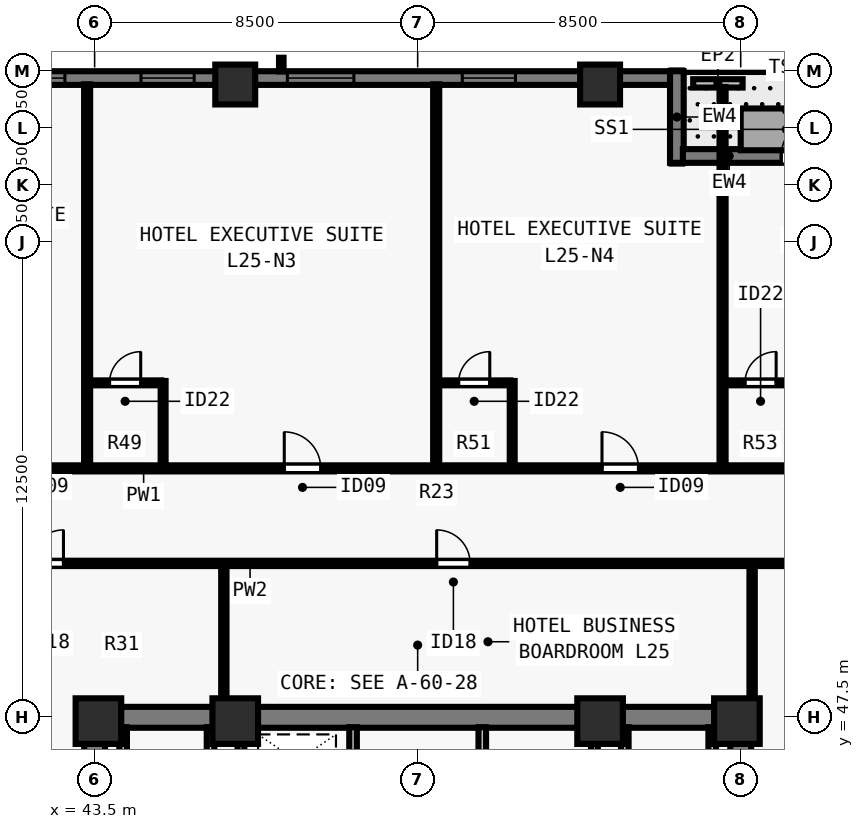
"""IFC4 building model, lengths in metres.
Left out: names, types, materials, properties, quantities, classifications, styles, units other than length and angle.
Written with IfcOpenShell. Run it as: python <this file> out.ifc"""

import sys

from ifc_helpers import new_model, si_unit, direction, frame, frame_2d, origin, origin_2d, place, context, subcontext, project, spatial, rectangle, extrude, element, fill, save


model = new_model("IFC4")
c1 = context("Model", 3, precision=1e-05, world=origin(), true_north=direction((0.0, 1.0)))
c2 = subcontext(c1, "Body", "Model", "MODEL_VIEW")
j1 = project(units=[si_unit("LENGTHUNIT", "METRE"), si_unit("PLANEANGLEUNIT", "RADIAN")], contexts=[c1])
p1 = place(None, origin())
s1 = spatial("IfcSite", under=j1, at=p1, CompositionType="ELEMENT")
p2 = place(p1, origin())
s2 = spatial("IfcBuilding", under=s1, at=p2, CompositionType="ELEMENT")
p3 = place(p2, frame((0.0, 0.0, 93.5)))
s3 = spatial("IfcBuildingStorey", under=s2, at=p3, CompositionType="ELEMENT", Elevation=93.5)
for number, where, z_axis, x_axis in (
    (1, (43.6, 47.4, 0.0), (0.0, 0.0, 1.0), (1.0, 0.0, 0.0)),
    (2, (47.2, 47.4, 0.0), (0.0, 0.0, 1.0), (1.0, 0.0, 0.0)),
    (3, (56.8, 47.4, 0.0), (0.0, 0.0, 1.0), (1.0, 0.0, 0.0)),
    (4, (60.4, 47.4, 0.0), (0.0, 0.0, 1.0), (1.0, 0.0, 0.0)),
):
    element("IfcColumn", number, at=place(p3, frame(where, z_axis=z_axis, x_axis=x_axis)), inside=s3, PredefinedType="COLUMN", context=c2, shape_type="SweptSolid", body=[
        extrude(rectangle(XDim=1.2, YDim=1.2, at=origin_2d()), origin(), (0.0, 0.0, 1.0), 3.5),
    ])
for number, where, z_axis, x_axis in (
    (5, (56.8, 64.15, 0.0), (0.0, 0.0, 1.0), (1.0, 0.0, 0.0)),
    (6, (47.2, 64.15, 0.0), (0.0, 0.0, 1.0), (1.0, 0.0, 0.0)),
):
    element("IfcColumn", number, at=place(p3, frame(where, z_axis=z_axis, x_axis=x_axis)), inside=s3, PredefinedType="COLUMN", context=c2, shape_type="SweptSolid", body=[
        extrude(rectangle(XDim=1.05, YDim=1.05, at=origin_2d()), origin(), (0.0, 0.0, 1.0), 3.5),
    ])
p4 = place(p3, frame((29.5, 64.32, 0.0), z_axis=(0.0, 0.0, 1.0), x_axis=(1.0, 0.0, 0.0)))
e7 = element("IfcWall", 7, at=p4, inside=s3, PredefinedType="SOLIDWALL", context=c2, shape_type="SweptSolid", body=[
    extrude(rectangle(XDim=29.162, YDim=0.36, at=frame_2d((14.581, 0.0))), origin(), (0.0, 0.0, 1.0), 3.24),
])
p5 = place(p4, frame((3.914, 0.0, 0.8)))
e8 = element("IfcOpeningElement", 8, at=p5, cuts=e7, PredefinedType="OPENING", context=c2, shape_type="SweptSolid", body=[
    extrude(rectangle(XDim=1.75, YDim=1.504, at=frame_2d((0.875, 0.752))), frame((0.0, 0.19, 0.0), z_axis=(0.0, -1.0, 0.0), x_axis=(1.0, 0.0, 0.0)), (0.0, 0.0, 1.0), 0.38),
])
p6 = place(p4, frame((8.515, 0.0, 0.8)))
e9 = element("IfcOpeningElement", 9, at=p6, cuts=e7, PredefinedType="OPENING", context=c2, shape_type="SweptSolid", body=[
    extrude(rectangle(XDim=1.4, YDim=1.504, at=frame_2d((0.7, 0.752))), frame((0.0, 0.19, 0.0), z_axis=(0.0, -1.0, 0.0), x_axis=(1.0, 0.0, 0.0)), (0.0, 0.0, 1.0), 0.38),
])
p7 = place(p4, frame((11.468, 0.0, 0.8)))
e10 = element("IfcOpeningElement", 10, at=p7, cuts=e7, PredefinedType="OPENING", context=c2, shape_type="SweptSolid", body=[
    extrude(rectangle(XDim=1.75, YDim=1.504, at=frame_2d((0.875, 0.752))), frame((0.0, 0.19, 0.0), z_axis=(0.0, -1.0, 0.0), x_axis=(1.0, 0.0, 0.0)), (0.0, 0.0, 1.0), 0.38),
])
p8 = place(p4, frame((15.219, 0.0, 0.8)))
e11 = element("IfcOpeningElement", 11, at=p8, cuts=e7, PredefinedType="OPENING", context=c2, shape_type="SweptSolid", body=[
    extrude(rectangle(XDim=1.4, YDim=1.504, at=frame_2d((0.7, 0.752))), frame((0.0, 0.19, 0.0), z_axis=(0.0, -1.0, 0.0), x_axis=(1.0, 0.0, 0.0)), (0.0, 0.0, 1.0), 0.38),
])
p9 = place(p4, frame((19.072, 0.0, 0.8)))
e12 = element("IfcOpeningElement", 12, at=p9, cuts=e7, PredefinedType="OPENING", context=c2, shape_type="SweptSolid", body=[
    extrude(rectangle(XDim=1.75, YDim=1.504, at=frame_2d((0.875, 0.752))), frame((0.0, 0.19, 0.0), z_axis=(0.0, -1.0, 0.0), x_axis=(1.0, 0.0, 0.0)), (0.0, 0.0, 1.0), 0.38),
])
p10 = place(p4, frame((23.674, 0.0, 0.8)))
e13 = element("IfcOpeningElement", 13, at=p10, cuts=e7, PredefinedType="OPENING", context=c2, shape_type="SweptSolid", body=[
    extrude(rectangle(XDim=1.4, YDim=1.504, at=frame_2d((0.7, 0.752))), frame((0.0, 0.19, 0.0), z_axis=(0.0, -1.0, 0.0), x_axis=(1.0, 0.0, 0.0)), (0.0, 0.0, 1.0), 0.38),
])
p11 = place(p3, frame((58.82, 64.5, 0.0), z_axis=(0.0, 0.0, 1.0), x_axis=(0.0, -1.0, 0.0)))
e14 = element("IfcWall", 14, at=p11, inside=s3, PredefinedType="SOLIDWALL", context=c2, shape_type="SweptSolid", body=[
    extrude(rectangle(XDim=2.41, YDim=0.36, at=frame_2d((1.205, 0.0))), origin(), (0.0, 0.0, 1.0), 3.24),
])
p12 = place(p3, frame((58.978, 62.27, 0.0), z_axis=(0.0, 0.0, 1.0), x_axis=(1.0, 0.0, 0.0)))
e15 = element("IfcWall", 15, at=p12, inside=s3, PredefinedType="SOLIDWALL", context=c2, shape_type="SweptSolid", body=[
    extrude(rectangle(XDim=5.782, YDim=0.36, at=frame_2d((2.891, 0.0))), origin(), (0.0, 0.0, 1.0), 3.24),
])
p13 = place(p12, frame((2.588, 0.0, 0.0)))
e16 = element("IfcOpeningElement", 16, at=p13, cuts=e15, PredefinedType="OPENING", context=c2, shape_type="SweptSolid", body=[
    extrude(rectangle(XDim=1.0, YDim=2.15, at=frame_2d((0.5, 1.075))), frame((0.0, 0.19, 0.0), z_axis=(0.0, -1.0, 0.0), x_axis=(1.0, 0.0, 0.0)), (0.0, 0.0, 1.0), 0.38),
])
p14 = place(p3, frame((59.25, 64.18, 0.0), z_axis=(0.0, 0.0, 1.0), x_axis=(1.0, 0.0, 0.0)))
e17 = element("IfcWall", 17, at=p14, inside=s3, PredefinedType="PARAPET", context=c2, shape_type="SweptSolid", body=[
    extrude(rectangle(XDim=1.3, YDim=0.22, at=frame_2d((0.65, 0.0))), origin(), (0.0, 0.0, 1.0), 0.55),
])
p15 = place(p3, frame((43.225, 47.5, 0.0), z_axis=(0.0, 0.0, 1.0), x_axis=(1.0, 0.0, 0.0)))
e18 = element("IfcWall", 18, at=p15, inside=s3, PredefinedType="SHEAR", context=c2, shape_type="SweptSolid", body=[
    extrude(rectangle(XDim=17.55, YDim=0.55, at=frame_2d((8.775, 0.0))), origin(), (0.0, 0.0, 1.0), 3.24),
])
for number, where, z_axis, x_axis in (
    (19, (43.5, 40.8, 0.0), (0.0, 0.0, 1.0), (0.0, 1.0, 0.0)),
    (20, (60.5, 40.8, 0.0), (0.0, 0.0, 1.0), (0.0, 1.0, 0.0)),
):
    element("IfcWall", number, at=place(p3, frame(where, z_axis=z_axis, x_axis=x_axis)), inside=s3, PredefinedType="SHEAR", context=c2, shape_type="SweptSolid", body=[
        extrude(rectangle(XDim=6.435, YDim=0.55, at=frame_2d((3.218, 0.0))), origin(), (0.0, 0.0, 1.0), 3.24),
    ])
p16 = place(p3, frame((50.3, 40.585, 0.0), z_axis=(0.0, 0.0, 1.0), x_axis=(0.0, 1.0, 0.0)))
e21 = element("IfcWall", 21, at=p16, inside=s3, PredefinedType="SOLIDWALL", context=c2, shape_type="SweptSolid", body=[
    extrude(rectangle(XDim=6.655, YDim=0.2, at=frame_2d((3.328, 0.0))), origin(), (0.0, 0.0, 1.0), 3.24),
])
p17 = place(p16, frame((5.065, 0.0, 0.0)))
e22 = element("IfcOpeningElement", 22, at=p17, cuts=e21, PredefinedType="OPENING", context=c2, shape_type="SweptSolid", body=[
    extrude(rectangle(XDim=0.8, YDim=2.08, at=frame_2d((0.4, 1.04))), frame((0.0, 0.11, 0.0), z_axis=(0.0, -1.0, 0.0), x_axis=(1.0, 0.0, 0.0)), (0.0, 0.0, 1.0), 0.22),
])
p18 = place(p3, frame((53.7, 40.585, 0.0), z_axis=(0.0, 0.0, 1.0), x_axis=(0.0, 1.0, 0.0)))
e23 = element("IfcWall", 23, at=p18, inside=s3, PredefinedType="SOLIDWALL", context=c2, shape_type="SweptSolid", body=[
    extrude(rectangle(XDim=6.655, YDim=0.2, at=frame_2d((3.328, 0.0))), origin(), (0.0, 0.0, 1.0), 3.24),
])
p19 = place(p18, frame((0.195, 0.0, 0.0)))
e24 = element("IfcOpeningElement", 24, at=p19, cuts=e23, PredefinedType="OPENING", context=c2, shape_type="SweptSolid", body=[
    extrude(rectangle(XDim=0.8, YDim=2.08, at=frame_2d((0.4, 1.04))), frame((0.0, 0.11, 0.0), z_axis=(0.0, -1.0, 0.0), x_axis=(1.0, 0.0, 0.0)), (0.0, 0.0, 1.0), 0.22),
])
p20 = place(p18, frame((4.265, 0.0, 0.0)))
e25 = element("IfcOpeningElement", 25, at=p20, cuts=e23, PredefinedType="OPENING", context=c2, shape_type="SweptSolid", body=[
    extrude(rectangle(XDim=0.95, YDim=2.12, at=frame_2d((0.475, 1.06))), frame((0.0, 0.11, 0.0), z_axis=(0.0, -1.0, 0.0), x_axis=(1.0, 0.0, 0.0)), (0.0, 0.0, 1.0), 0.22),
])
for number, where, z_axis, x_axis in (
    (26, (46.55, 43.735, 0.0), (0.0, 0.0, 1.0), (0.0, 1.0, 0.0)),
    (27, (44.25, 43.735, 0.0), (0.0, 0.0, 1.0), (0.0, 1.0, 0.0)),
    (28, (57.45, 43.735, 0.0), (0.0, 0.0, 1.0), (0.0, 1.0, 0.0)),
    (29, (59.75, 43.735, 0.0), (0.0, 0.0, 1.0), (0.0, 1.0, 0.0)),
):
    element("IfcWall", number, at=place(p3, frame(where, z_axis=z_axis, x_axis=x_axis)), inside=s3, PredefinedType="SOLIDWALL", context=c2, shape_type="SweptSolid", body=[
        extrude(rectangle(XDim=3.505, YDim=0.2, at=frame_2d((1.752, 0.0))), origin(), (0.0, 0.0, 1.0), 3.24),
    ])
for number, where, z_axis, x_axis in (
    (30, (47.35, 43.735, 0.0), (0.0, 0.0, 1.0), (0.0, 1.0, 0.0)),
    (31, (56.65, 43.735, 0.0), (0.0, 0.0, 1.0), (0.0, 1.0, 0.0)),
):
    element("IfcWall", number, at=place(p3, frame(where, z_axis=z_axis, x_axis=x_axis)), inside=s3, PredefinedType="SOLIDWALL", context=c2, shape_type="SweptSolid", body=[
        extrude(rectangle(XDim=3.505, YDim=0.18, at=frame_2d((1.752, 0.0))), origin(), (0.0, 0.0, 1.0), 3.24),
    ])
p21 = place(p3, frame((37.1, 54.05, 0.0), z_axis=(0.0, 0.0, 1.0), x_axis=(1.0, 0.0, 0.0)))
e32 = element("IfcWall", 32, at=p21, inside=s3, PredefinedType="PARTITIONING", context=c2, shape_type="SweptSolid", body=[
    extrude(rectangle(XDim=29.8, YDim=0.16, at=frame_2d((14.9, 0.0))), origin(), (0.0, 0.0, 1.0), 3.24),
])
p22 = place(p21, frame((0.91, 0.0, 0.0)))
e33 = element("IfcOpeningElement", 33, at=p22, cuts=e32, PredefinedType="OPENING", context=c2, shape_type="SweptSolid", body=[
    extrude(rectangle(XDim=0.96, YDim=2.15, at=frame_2d((0.48, 1.075))), frame((0.0, 0.09, 0.0), z_axis=(0.0, -1.0, 0.0), x_axis=(1.0, 0.0, 0.0)), (0.0, 0.0, 1.0), 0.18),
])
p23 = place(p21, frame((3.03, 0.0, 0.0)))
e34 = element("IfcOpeningElement", 34, at=p23, cuts=e32, PredefinedType="OPENING", context=c2, shape_type="SweptSolid", body=[
    extrude(rectangle(XDim=0.96, YDim=2.15, at=frame_2d((0.48, 1.075))), frame((0.0, 0.09, 0.0), z_axis=(0.0, -1.0, 0.0), x_axis=(1.0, 0.0, 0.0)), (0.0, 0.0, 1.0), 0.18),
])
p24 = place(p21, frame((11.39, 0.0, 0.0)))
e35 = element("IfcOpeningElement", 35, at=p24, cuts=e32, PredefinedType="OPENING", context=c2, shape_type="SweptSolid", body=[
    extrude(rectangle(XDim=0.96, YDim=2.15, at=frame_2d((0.48, 1.075))), frame((0.0, 0.09, 0.0), z_axis=(0.0, -1.0, 0.0), x_axis=(1.0, 0.0, 0.0)), (0.0, 0.0, 1.0), 0.18),
])
p25 = place(p21, frame((19.75, 0.0, 0.0)))
e36 = element("IfcOpeningElement", 36, at=p25, cuts=e32, PredefinedType="OPENING", context=c2, shape_type="SweptSolid", body=[
    extrude(rectangle(XDim=0.96, YDim=2.15, at=frame_2d((0.48, 1.075))), frame((0.0, 0.09, 0.0), z_axis=(0.0, -1.0, 0.0), x_axis=(1.0, 0.0, 0.0)), (0.0, 0.0, 1.0), 0.18),
])
p26 = place(p21, frame((26.931, 0.0, 0.0)))
e37 = element("IfcOpeningElement", 37, at=p26, cuts=e32, PredefinedType="OPENING", context=c2, shape_type="SweptSolid", body=[
    extrude(rectangle(XDim=0.96, YDim=2.15, at=frame_2d((0.48, 1.075))), frame((0.0, 0.09, 0.0), z_axis=(0.0, -1.0, 0.0), x_axis=(1.0, 0.0, 0.0)), (0.0, 0.0, 1.0), 0.18),
])
p27 = place(p21, frame((28.48, 0.0, 0.0)))
e38 = element("IfcOpeningElement", 38, at=p27, cuts=e32, PredefinedType="OPENING", context=c2, shape_type="SweptSolid", body=[
    extrude(rectangle(XDim=0.96, YDim=2.15, at=frame_2d((0.48, 1.075))), frame((0.0, 0.09, 0.0), z_axis=(0.0, -1.0, 0.0), x_axis=(1.0, 0.0, 0.0)), (0.0, 0.0, 1.0), 0.18),
])
p28 = place(p3, frame((39.6, 51.55, 0.0), z_axis=(0.0, 0.0, 1.0), x_axis=(1.0, 0.0, 0.0)))
e39 = element("IfcWall", 39, at=p28, inside=s3, PredefinedType="PARTITIONING", context=c2, shape_type="SweptSolid", body=[
    extrude(rectangle(XDim=24.8, YDim=0.14, at=frame_2d((12.4, 0.0))), origin(), (0.0, 0.0, 1.0), 3.24),
])
p29 = place(p28, frame((2.2, 0.0, 0.0)))
e40 = element("IfcOpeningElement", 40, at=p29, cuts=e39, PredefinedType="OPENING", context=c2, shape_type="SweptSolid", body=[
    extrude(rectangle(XDim=0.88, YDim=2.1, at=frame_2d((0.44, 1.05))), frame((0.0, 0.08, 0.0), z_axis=(0.0, -1.0, 0.0), x_axis=(1.0, 0.0, 0.0)), (0.0, 0.0, 1.0), 0.16),
])
p30 = place(p28, frame((12.9, 0.0, 0.0)))
e41 = element("IfcOpeningElement", 41, at=p30, cuts=e39, PredefinedType="OPENING", context=c2, shape_type="SweptSolid", body=[
    extrude(rectangle(XDim=0.88, YDim=2.1, at=frame_2d((0.44, 1.05))), frame((0.0, 0.08, 0.0), z_axis=(0.0, -1.0, 0.0), x_axis=(1.0, 0.0, 0.0)), (0.0, 0.0, 1.0), 0.16),
])
p31 = place(p28, frame((22.4, 0.0, 0.0)))
e42 = element("IfcOpeningElement", 42, at=p31, cuts=e39, PredefinedType="OPENING", context=c2, shape_type="SweptSolid", body=[
    extrude(rectangle(XDim=0.88, YDim=2.1, at=frame_2d((0.44, 1.05))), frame((0.0, 0.08, 0.0), z_axis=(0.0, -1.0, 0.0), x_axis=(1.0, 0.0, 0.0)), (0.0, 0.0, 1.0), 0.16),
])
p32 = place(p3, frame((46.9, 47.76, 0.0), z_axis=(0.0, 0.0, 1.0), x_axis=(0.0, 1.0, 0.0)))
e43 = element("IfcWall", 43, at=p32, inside=s3, PredefinedType="PARTITIONING", context=c2, shape_type="SweptSolid", body=[
    extrude(rectangle(XDim=3.735, YDim=0.14, at=frame_2d((1.868, 0.0))), origin(), (0.0, 0.0, 1.0), 3.24),
])
p33 = place(p3, frame((60.8, 47.76, 0.0), z_axis=(0.0, 0.0, 1.0), x_axis=(0.0, 1.0, 0.0)))
e44 = element("IfcWall", 44, at=p33, inside=s3, PredefinedType="PARTITIONING", context=c2, shape_type="SweptSolid", body=[
    extrude(rectangle(XDim=3.735, YDim=0.14, at=frame_2d((1.868, 0.0))), origin(), (0.0, 0.0, 1.0), 2.399),
])
p34 = place(p3, frame((43.302, 54.115, 0.0), z_axis=(0.0, 0.0, 1.0), x_axis=(0.0, 1.0, 0.0)))
e45 = element("IfcWall", 45, at=p34, inside=s3, PredefinedType="PARTITIONING", context=c2, shape_type="SweptSolid", body=[
    extrude(rectangle(XDim=10.04, YDim=0.16, at=frame_2d((5.02, 0.0))), origin(), (0.0, 0.0, 1.0), 3.24),
])
p35 = place(p3, frame((45.302, 54.115, 0.0), z_axis=(0.0, 0.0, 1.0), x_axis=(0.0, 1.0, 0.0)))
e46 = element("IfcWall", 46, at=p35, inside=s3, PredefinedType="PLUMBINGWALL", context=c2, shape_type="SweptSolid", body=[
    extrude(rectangle(XDim=2.235, YDim=0.13, at=frame_2d((1.118, 0.0))), origin(), (0.0, 0.0, 1.0), 3.24),
])
p36 = place(p3, frame((43.367, 56.3, 0.0), z_axis=(0.0, 0.0, 1.0), x_axis=(1.0, 0.0, 0.0)))
e47 = element("IfcWall", 47, at=p36, inside=s3, PredefinedType="PLUMBINGWALL", context=c2, shape_type="SweptSolid", body=[
    extrude(rectangle(XDim=1.885, YDim=0.13, at=frame_2d((0.942, 0.0))), origin(), (0.0, 0.0, 1.0), 3.24),
])
p37 = place(p36, frame((0.525, 0.0, 0.0)))
e48 = element("IfcOpeningElement", 48, at=p37, cuts=e47, PredefinedType="OPENING", context=c2, shape_type="SweptSolid", body=[
    extrude(rectangle(XDim=0.82, YDim=2.1, at=frame_2d((0.41, 1.05))), frame((0.0, 0.075, 0.0), z_axis=(0.0, -1.0, 0.0), x_axis=(1.0, 0.0, 0.0)), (0.0, 0.0, 1.0), 0.15),
])
p38 = place(p3, frame((52.488, 54.115, 0.0), z_axis=(0.0, 0.0, 1.0), x_axis=(0.0, 1.0, 0.0)))
e49 = element("IfcWall", 49, at=p38, inside=s3, PredefinedType="PARTITIONING", context=c2, shape_type="SweptSolid", body=[
    extrude(rectangle(XDim=10.04, YDim=0.16, at=frame_2d((5.02, 0.0))), origin(), (0.0, 0.0, 1.0), 2.809),
])
p39 = place(p3, frame((54.488, 54.115, 0.0), z_axis=(0.0, 0.0, 1.0), x_axis=(0.0, 1.0, 0.0)))
e50 = element("IfcWall", 50, at=p39, inside=s3, PredefinedType="PLUMBINGWALL", context=c2, shape_type="SweptSolid", body=[
    extrude(rectangle(XDim=2.235, YDim=0.13, at=frame_2d((1.118, 0.0))), origin(), (0.0, 0.0, 1.0), 3.24),
])
p40 = place(p3, frame((52.552, 56.3, 0.0), z_axis=(0.0, 0.0, 1.0), x_axis=(1.0, 0.0, 0.0)))
e51 = element("IfcWall", 51, at=p40, inside=s3, PredefinedType="PLUMBINGWALL", context=c2, shape_type="SweptSolid", body=[
    extrude(rectangle(XDim=1.885, YDim=0.13, at=frame_2d((0.942, 0.0))), origin(), (0.0, 0.0, 1.0), 3.24),
])
p41 = place(p40, frame((0.525, 0.0, 0.0)))
e52 = element("IfcOpeningElement", 52, at=p41, cuts=e51, PredefinedType="OPENING", context=c2, shape_type="SweptSolid", body=[
    extrude(rectangle(XDim=0.82, YDim=2.1, at=frame_2d((0.41, 1.05))), frame((0.0, 0.075, 0.0), z_axis=(0.0, -1.0, 0.0), x_axis=(1.0, 0.0, 0.0)), (0.0, 0.0, 1.0), 0.15),
])
p42 = place(p3, frame((60.022, 54.115, 0.0), z_axis=(0.0, 0.0, 1.0), x_axis=(0.0, 1.0, 0.0)))
e53 = element("IfcWall", 53, at=p42, inside=s3, PredefinedType="PARTITIONING", context=c2, shape_type="SweptSolid", body=[
    extrude(rectangle(XDim=9.97, YDim=0.16, at=frame_2d((4.985, 0.0))), origin(), (0.0, 0.0, 1.0), 3.24),
])
p43 = place(p3, frame((60.087, 56.3, 0.0), z_axis=(0.0, 0.0, 1.0), x_axis=(1.0, 0.0, 0.0)))
e54 = element("IfcWall", 54, at=p43, inside=s3, PredefinedType="PLUMBINGWALL", context=c2, shape_type="SweptSolid", body=[
    extrude(rectangle(XDim=1.885, YDim=0.13, at=frame_2d((0.942, 0.0))), origin(), (0.0, 0.0, 1.0), 3.24),
])
p44 = place(p43, frame((0.525, 0.0, 0.0)))
e55 = element("IfcOpeningElement", 55, at=p44, cuts=e54, PredefinedType="OPENING", context=c2, shape_type="SweptSolid", body=[
    extrude(rectangle(XDim=0.82, YDim=2.1, at=frame_2d((0.41, 1.05))), frame((0.0, 0.075, 0.0), z_axis=(0.0, -1.0, 0.0), x_axis=(1.0, 0.0, 0.0)), (0.0, 0.0, 1.0), 0.15),
])
p45 = place(p7, origin())
e56 = element("IfcWindow", 56, at=p45, inside=s3, PartitioningType="SINGLE_PANEL", PredefinedType="WINDOW", context=c2, shape_type="SweptSolid", body=[
    extrude(rectangle(XDim=1.75, YDim=1.504, at=frame_2d((0.875, 0.752))), frame((0.0, -0.05, 0.0), z_axis=(0.0, -1.0, 0.0), x_axis=(1.0, 0.0, 0.0)), (0.0, 0.0, 1.0), 0.06),
])
fill(e10, e56)
p46 = place(p8, origin())
e57 = element("IfcWindow", 57, at=p46, inside=s3, PartitioningType="SINGLE_PANEL", PredefinedType="WINDOW", context=c2, shape_type="SweptSolid", body=[
    extrude(rectangle(XDim=1.4, YDim=1.504, at=frame_2d((0.7, 0.752))), frame((0.0, -0.05, 0.0), z_axis=(0.0, -1.0, 0.0), x_axis=(1.0, 0.0, 0.0)), (0.0, 0.0, 1.0), 0.06),
])
fill(e11, e57)
p47 = place(p9, origin())
e58 = element("IfcWindow", 58, at=p47, inside=s3, PartitioningType="SINGLE_PANEL", PredefinedType="WINDOW", context=c2, shape_type="SweptSolid", body=[
    extrude(rectangle(XDim=1.75, YDim=1.504, at=frame_2d((0.875, 0.752))), frame((0.0, -0.05, 0.0), z_axis=(0.0, -1.0, 0.0), x_axis=(1.0, 0.0, 0.0)), (0.0, 0.0, 1.0), 0.06),
])
fill(e12, e58)
p48 = place(p10, origin())
e59 = element("IfcWindow", 59, at=p48, inside=s3, PartitioningType="SINGLE_PANEL", PredefinedType="WINDOW", context=c2, shape_type="SweptSolid", body=[
    extrude(rectangle(XDim=1.4, YDim=1.504, at=frame_2d((0.7, 0.752))), frame((0.0, -0.05, 0.0), z_axis=(0.0, -1.0, 0.0), x_axis=(1.0, 0.0, 0.0)), (0.0, 0.0, 1.0), 0.06),
])
fill(e13, e59)
p49 = place(p13, origin())
e60 = element("IfcDoor", 60, at=p49, inside=s3, OperationType="SINGLE_SWING_RIGHT", PredefinedType="DOOR", context=c2, shape_type="SweptSolid", body=[
    extrude(rectangle(XDim=1.0, YDim=2.15, at=frame_2d((0.5, 1.075))), frame((0.0, 0.025, 0.0), z_axis=(0.0, -1.0, 0.0), x_axis=(1.0, 0.0, 0.0)), (0.0, 0.0, 1.0), 0.05),
])
fill(e16, e60)
p50 = place(p29, origin())
e61 = element("IfcDoor", 61, at=p50, inside=s3, OperationType="SINGLE_SWING_RIGHT", PredefinedType="DOOR", context=c2, shape_type="SweptSolid", body=[
    extrude(rectangle(XDim=0.88, YDim=2.1, at=frame_2d((0.44, 1.05))), frame((0.0, 0.025, 0.0), z_axis=(0.0, -1.0, 0.0), x_axis=(1.0, 0.0, 0.0)), (0.0, 0.0, 1.0), 0.05),
])
fill(e40, e61)
p51 = place(p30, origin())
e62 = element("IfcDoor", 62, at=p51, inside=s3, OperationType="SINGLE_SWING_LEFT", PredefinedType="DOOR", context=c2, shape_type="SweptSolid", body=[
    extrude(rectangle(XDim=0.88, YDim=2.1, at=frame_2d((0.44, 1.05))), frame((0.0, 0.025, 0.0), z_axis=(0.0, -1.0, 0.0), x_axis=(1.0, 0.0, 0.0)), (0.0, 0.0, 1.0), 0.05),
])
fill(e41, e62)
p52 = place(p37, origin())
e63 = element("IfcDoor", 63, at=p52, inside=s3, OperationType="SINGLE_SWING_RIGHT", PredefinedType="DOOR", context=c2, shape_type="SweptSolid", body=[
    extrude(rectangle(XDim=0.82, YDim=2.1, at=frame_2d((0.41, 1.05))), frame((0.0, 0.025, 0.0), z_axis=(0.0, -1.0, 0.0), x_axis=(1.0, 0.0, 0.0)), (0.0, 0.0, 1.0), 0.05),
])
fill(e48, e63)
p53 = place(p24, origin())
e64 = element("IfcDoor", 64, at=p53, inside=s3, OperationType="SINGLE_SWING_LEFT", PredefinedType="DOOR", context=c2, shape_type="SweptSolid", body=[
    extrude(rectangle(XDim=0.96, YDim=2.15, at=frame_2d((0.48, 1.075))), frame((0.0, 0.025, 0.0), z_axis=(0.0, -1.0, 0.0), x_axis=(1.0, 0.0, 0.0)), (0.0, 0.0, 1.0), 0.05),
])
fill(e35, e64)
p54 = place(p41, origin())
e65 = element("IfcDoor", 65, at=p54, inside=s3, OperationType="SINGLE_SWING_RIGHT", PredefinedType="DOOR", context=c2, shape_type="SweptSolid", body=[
    extrude(rectangle(XDim=0.82, YDim=2.1, at=frame_2d((0.41, 1.05))), frame((0.0, 0.025, 0.0), z_axis=(0.0, -1.0, 0.0), x_axis=(1.0, 0.0, 0.0)), (0.0, 0.0, 1.0), 0.05),
])
fill(e52, e65)
p55 = place(p25, origin())
e66 = element("IfcDoor", 66, at=p55, inside=s3, OperationType="SINGLE_SWING_LEFT", PredefinedType="DOOR", context=c2, shape_type="SweptSolid", body=[
    extrude(rectangle(XDim=0.96, YDim=2.15, at=frame_2d((0.48, 1.075))), frame((0.0, 0.025, 0.0), z_axis=(0.0, -1.0, 0.0), x_axis=(1.0, 0.0, 0.0)), (0.0, 0.0, 1.0), 0.05),
])
fill(e36, e66)
p56 = place(p44, origin())
e67 = element("IfcDoor", 67, at=p56, inside=s3, OperationType="SINGLE_SWING_RIGHT", PredefinedType="DOOR", context=c2, shape_type="SweptSolid", body=[
    extrude(rectangle(XDim=0.82, YDim=2.1, at=frame_2d((0.41, 1.05))), frame((0.0, 0.025, 0.0), z_axis=(0.0, -1.0, 0.0), x_axis=(1.0, 0.0, 0.0)), (0.0, 0.0, 1.0), 0.05),
])
fill(e55, e67)
save(model, sys.argv[1])
